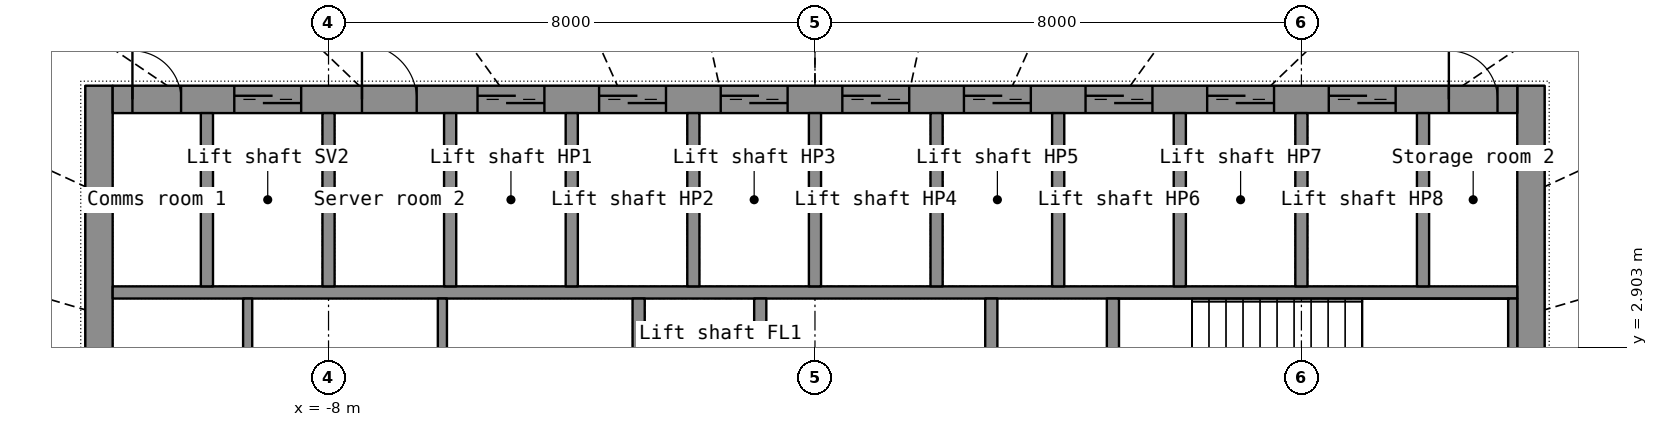
"""IFC4 building model, lengths in metres.
Left out: names, types, materials, properties, quantities, classifications, styles, units other than length and angle.
Written with IfcOpenShell. Run it as: python <this file> out.ifc"""

import sys

from ifc_helpers import new_model, si_unit, direction, frame, frame_2d, origin, place, context, subcontext, project, spatial, rectangle, extrude, element, fill, save


model = new_model("IFC4")
c1 = context("Model", 3, precision=1e-05, world=origin(), true_north=direction((0.0, 1.0)))
c2 = subcontext(c1, "Body", "Model", "MODEL_VIEW")
j1 = project(units=[si_unit("LENGTHUNIT", "METRE"), si_unit("PLANEANGLEUNIT", "RADIAN")], contexts=[c1])
p1 = place(None, origin())
s1 = spatial("IfcSite", under=j1, at=p1, CompositionType="ELEMENT")
p2 = place(p1, origin())
s2 = spatial("IfcBuilding", under=s1, at=p2, CompositionType="ELEMENT")
p3 = place(p2, frame((0.0, 0.0, 205.2)))
s3 = spatial("IfcBuildingStorey", under=s2, at=p3, CompositionType="ELEMENT", Elevation=205.2)
p4 = place(p3, frame((-11.775, -7.2, 0.0), z_axis=(0.0, 0.0, 1.0), x_axis=(0.0, 1.0, 0.0)))
e1 = element("IfcWall", 1, at=p4, inside=s3, PredefinedType="SHEAR", context=c2, shape_type="SweptSolid", body=[
    extrude(rectangle(XDim=14.4, YDim=0.45, at=frame_2d((7.2, 0.0))), origin(), (0.0, 0.0, 1.0), 7.0),
])
p5 = place(p4, frame((6.5, 0.0, 0.0)))
e2 = element("IfcOpeningElement", 2, at=p5, cuts=e1, PredefinedType="OPENING", context=c2, shape_type="SweptSolid", body=[
    extrude(rectangle(XDim=1.4, YDim=2.2, at=frame_2d((0.7, 1.1))), frame((0.0, 0.235, 0.0), z_axis=(0.0, -1.0, 0.0), x_axis=(1.0, 0.0, 0.0)), (0.0, 0.0, 1.0), 0.47),
])
p6 = place(p3, frame((11.775, -7.2, 0.0), z_axis=(0.0, 0.0, 1.0), x_axis=(0.0, 1.0, 0.0)))
e3 = element("IfcWall", 3, at=p6, inside=s3, PredefinedType="SHEAR", context=c2, shape_type="SweptSolid", body=[
    extrude(rectangle(XDim=14.4, YDim=0.45, at=frame_2d((7.2, 0.0))), origin(), (0.0, 0.0, 1.0), 7.0),
])
p7 = place(p6, frame((6.5, 0.0, 0.0)))
e4 = element("IfcOpeningElement", 4, at=p7, cuts=e3, PredefinedType="OPENING", context=c2, shape_type="SweptSolid", body=[
    extrude(rectangle(XDim=1.4, YDim=2.2, at=frame_2d((0.7, 1.1))), frame((0.0, 0.235, 0.0), z_axis=(0.0, -1.0, 0.0), x_axis=(1.0, 0.0, 0.0)), (0.0, 0.0, 1.0), 0.47),
])
p8 = place(p3, frame((-11.55, 6.975, 0.0), z_axis=(0.0, 0.0, 1.0), x_axis=(1.0, 0.0, 0.0)))
e5 = element("IfcWall", 5, at=p8, inside=s3, PredefinedType="SHEAR", context=c2, shape_type="SweptSolid", body=[
    extrude(rectangle(XDim=23.1, YDim=0.45, at=frame_2d((11.55, 0.0))), origin(), (0.0, 0.0, 1.0), 7.0),
])
p9 = place(p8, frame((2.0, 0.0, 0.0)))
e6 = element("IfcOpeningElement", 6, at=p9, cuts=e5, PredefinedType="OPENING", context=c2, shape_type="SweptSolid", body=[
    extrude(rectangle(XDim=1.1, YDim=2.2, at=frame_2d((0.55, 1.1))), frame((0.0, 0.235, 0.0), z_axis=(0.0, -1.0, 0.0), x_axis=(1.0, 0.0, 0.0)), (0.0, 0.0, 1.0), 0.47),
])
p10 = place(p8, frame((6.0, 0.0, 0.0)))
e7 = element("IfcOpeningElement", 7, at=p10, cuts=e5, PredefinedType="OPENING", context=c2, shape_type="SweptSolid", body=[
    extrude(rectangle(XDim=1.1, YDim=2.2, at=frame_2d((0.55, 1.1))), frame((0.0, 0.235, 0.0), z_axis=(0.0, -1.0, 0.0), x_axis=(1.0, 0.0, 0.0)), (0.0, 0.0, 1.0), 0.47),
])
p11 = place(p8, frame((8.0, 0.0, 0.0)))
e8 = element("IfcOpeningElement", 8, at=p11, cuts=e5, PredefinedType="OPENING", context=c2, shape_type="SweptSolid", body=[
    extrude(rectangle(XDim=1.1, YDim=2.2, at=frame_2d((0.55, 1.1))), frame((0.0, 0.235, 0.0), z_axis=(0.0, -1.0, 0.0), x_axis=(1.0, 0.0, 0.0)), (0.0, 0.0, 1.0), 0.47),
])
p12 = place(p8, frame((10.0, 0.0, 0.0)))
e9 = element("IfcOpeningElement", 9, at=p12, cuts=e5, PredefinedType="OPENING", context=c2, shape_type="SweptSolid", body=[
    extrude(rectangle(XDim=1.1, YDim=2.2, at=frame_2d((0.55, 1.1))), frame((0.0, 0.235, 0.0), z_axis=(0.0, -1.0, 0.0), x_axis=(1.0, 0.0, 0.0)), (0.0, 0.0, 1.0), 0.47),
])
p13 = place(p8, frame((12.0, 0.0, 0.0)))
e10 = element("IfcOpeningElement", 10, at=p13, cuts=e5, PredefinedType="OPENING", context=c2, shape_type="SweptSolid", body=[
    extrude(rectangle(XDim=1.1, YDim=2.2, at=frame_2d((0.55, 1.1))), frame((0.0, 0.235, 0.0), z_axis=(0.0, -1.0, 0.0), x_axis=(1.0, 0.0, 0.0)), (0.0, 0.0, 1.0), 0.47),
])
p14 = place(p8, frame((14.0, 0.0, 0.0)))
e11 = element("IfcOpeningElement", 11, at=p14, cuts=e5, PredefinedType="OPENING", context=c2, shape_type="SweptSolid", body=[
    extrude(rectangle(XDim=1.1, YDim=2.2, at=frame_2d((0.55, 1.1))), frame((0.0, 0.235, 0.0), z_axis=(0.0, -1.0, 0.0), x_axis=(1.0, 0.0, 0.0)), (0.0, 0.0, 1.0), 0.47),
])
p15 = place(p8, frame((16.0, 0.0, 0.0)))
e12 = element("IfcOpeningElement", 12, at=p15, cuts=e5, PredefinedType="OPENING", context=c2, shape_type="SweptSolid", body=[
    extrude(rectangle(XDim=1.1, YDim=2.2, at=frame_2d((0.55, 1.1))), frame((0.0, 0.235, 0.0), z_axis=(0.0, -1.0, 0.0), x_axis=(1.0, 0.0, 0.0)), (0.0, 0.0, 1.0), 0.47),
])
p16 = place(p8, frame((18.0, 0.0, 0.0)))
e13 = element("IfcOpeningElement", 13, at=p16, cuts=e5, PredefinedType="OPENING", context=c2, shape_type="SweptSolid", body=[
    extrude(rectangle(XDim=1.1, YDim=2.2, at=frame_2d((0.55, 1.1))), frame((0.0, 0.235, 0.0), z_axis=(0.0, -1.0, 0.0), x_axis=(1.0, 0.0, 0.0)), (0.0, 0.0, 1.0), 0.47),
])
p17 = place(p8, frame((20.0, 0.0, 0.0)))
e14 = element("IfcOpeningElement", 14, at=p17, cuts=e5, PredefinedType="OPENING", context=c2, shape_type="SweptSolid", body=[
    extrude(rectangle(XDim=1.1, YDim=2.2, at=frame_2d((0.55, 1.1))), frame((0.0, 0.235, 0.0), z_axis=(0.0, -1.0, 0.0), x_axis=(1.0, 0.0, 0.0)), (0.0, 0.0, 1.0), 0.47),
])
p18 = place(p8, frame((4.1, 0.0, 0.0)))
e15 = element("IfcOpeningElement", 15, at=p18, cuts=e5, PredefinedType="OPENING", context=c2, shape_type="SweptSolid", body=[
    extrude(rectangle(XDim=0.9, YDim=2.1, at=frame_2d((0.45, 1.05))), frame((0.0, 0.235, 0.0), z_axis=(0.0, -1.0, 0.0), x_axis=(1.0, 0.0, 0.0)), (0.0, 0.0, 1.0), 0.47),
])
p19 = place(p8, frame((0.325, 0.0, 0.0)))
e16 = element("IfcOpeningElement", 16, at=p19, cuts=e5, PredefinedType="OPENING", context=c2, shape_type="SweptSolid", body=[
    extrude(rectangle(XDim=0.8, YDim=2.05, at=frame_2d((0.4, 1.025))), frame((0.0, 0.235, 0.0), z_axis=(0.0, -1.0, 0.0), x_axis=(1.0, 0.0, 0.0)), (0.0, 0.0, 1.0), 0.47),
])
p20 = place(p8, frame((21.975, 0.0, 0.0)))
e17 = element("IfcOpeningElement", 17, at=p20, cuts=e5, PredefinedType="OPENING", context=c2, shape_type="SweptSolid", body=[
    extrude(rectangle(XDim=0.8, YDim=2.05, at=frame_2d((0.4, 1.025))), frame((0.0, 0.235, 0.0), z_axis=(0.0, -1.0, 0.0), x_axis=(1.0, 0.0, 0.0)), (0.0, 0.0, 1.0), 0.47),
])
p21 = place(p3, frame((-11.55, 3.8, 0.0), z_axis=(0.0, 0.0, 1.0), x_axis=(1.0, 0.0, 0.0)))
e18 = element("IfcWall", 18, at=p21, inside=s3, PredefinedType="SHEAR", context=c2, shape_type="SweptSolid", body=[
    extrude(rectangle(XDim=23.1, YDim=0.2, at=frame_2d((11.55, 0.0))), origin(), (0.0, 0.0, 1.0), 7.0),
])
for number, where, z_axis, x_axis in (
    (19, (-10.0, 3.9, 0.0), (0.0, 0.0, 1.0), (0.0, 1.0, 0.0)),
    (20, (-8.0, 3.9, 0.0), (0.0, 0.0, 1.0), (0.0, 1.0, 0.0)),
    (21, (-6.0, 3.9, 0.0), (0.0, 0.0, 1.0), (0.0, 1.0, 0.0)),
    (22, (-4.0, 3.9, 0.0), (0.0, 0.0, 1.0), (0.0, 1.0, 0.0)),
    (23, (-2.0, 3.9, 0.0), (0.0, 0.0, 1.0), (0.0, 1.0, 0.0)),
    (24, (0.0, 3.9, 0.0), (0.0, 0.0, 1.0), (0.0, 1.0, 0.0)),
    (25, (2.0, 3.9, 0.0), (0.0, 0.0, 1.0), (0.0, 1.0, 0.0)),
    (26, (4.0, 3.9, 0.0), (0.0, 0.0, 1.0), (0.0, 1.0, 0.0)),
    (27, (6.0, 3.9, 0.0), (0.0, 0.0, 1.0), (0.0, 1.0, 0.0)),
    (28, (8.0, 3.9, 0.0), (0.0, 0.0, 1.0), (0.0, 1.0, 0.0)),
    (29, (10.0, 3.9, 0.0), (0.0, 0.0, 1.0), (0.0, 1.0, 0.0)),
):
    element("IfcWall", number, at=place(p3, frame(where, z_axis=z_axis, x_axis=x_axis)), inside=s3, PredefinedType="SHEAR", context=c2, shape_type="SweptSolid", body=[
        extrude(rectangle(XDim=2.85, YDim=0.2, at=frame_2d((1.425, 0.0))), origin(), (0.0, 0.0, 1.0), 7.0),
    ])
p22 = place(p3, frame((-2.9, -3.7, 0.0), z_axis=(0.0, 0.0, 1.0), x_axis=(0.0, 1.0, 0.0)))
e30 = element("IfcWall", 30, at=p22, inside=s3, PredefinedType="SHEAR", context=c2, shape_type="SweptSolid", body=[
    extrude(rectangle(XDim=7.4, YDim=0.2, at=frame_2d((3.7, 0.0))), origin(), (0.0, 0.0, 1.0), 7.0),
])
p23 = place(p22, frame((3.1, 0.0, 0.0)))
e31 = element("IfcOpeningElement", 31, at=p23, cuts=e30, PredefinedType="OPENING", context=c2, shape_type="SweptSolid", body=[
    extrude(rectangle(XDim=1.2, YDim=2.2, at=frame_2d((0.6, 1.1))), frame((0.0, 0.11, 0.0), z_axis=(0.0, -1.0, 0.0), x_axis=(1.0, 0.0, 0.0)), (0.0, 0.0, 1.0), 0.22),
])
p24 = place(p3, frame((2.9, -3.7, 0.0), z_axis=(0.0, 0.0, 1.0), x_axis=(0.0, 1.0, 0.0)))
e32 = element("IfcWall", 32, at=p24, inside=s3, PredefinedType="SHEAR", context=c2, shape_type="SweptSolid", body=[
    extrude(rectangle(XDim=7.4, YDim=0.2, at=frame_2d((3.7, 0.0))), origin(), (0.0, 0.0, 1.0), 7.0),
])
p25 = place(p24, frame((3.1, 0.0, 0.0)))
e33 = element("IfcOpeningElement", 33, at=p25, cuts=e32, PredefinedType="OPENING", context=c2, shape_type="SweptSolid", body=[
    extrude(rectangle(XDim=1.2, YDim=2.2, at=frame_2d((0.6, 1.1))), frame((0.0, 0.11, 0.0), z_axis=(0.0, -1.0, 0.0), x_axis=(1.0, 0.0, 0.0)), (0.0, 0.0, 1.0), 0.22),
])
p26 = place(p3, frame((-0.9, 1.35, 0.0), z_axis=(0.0, 0.0, 1.0), x_axis=(0.0, 1.0, 0.0)))
e34 = element("IfcWall", 34, at=p26, inside=s3, PredefinedType="SHEAR", context=c2, shape_type="SweptSolid", body=[
    extrude(rectangle(XDim=2.35, YDim=0.2, at=frame_2d((1.175, 0.0))), origin(), (0.0, 0.0, 1.0), 7.0),
])
p27 = place(p3, frame((11.475, 1.35, 0.0), z_axis=(0.0, 0.0, 1.0), x_axis=(0.0, 1.0, 0.0)))
e35 = element("IfcWall", 35, at=p27, inside=s3, PredefinedType="SHEAR", context=c2, shape_type="SweptSolid", body=[
    extrude(rectangle(XDim=2.35, YDim=0.15, at=frame_2d((1.175, 0.0))), origin(), (0.0, 0.0, 1.0), 7.0),
])
p28 = place(p3, frame((4.9, 1.35, 0.0), z_axis=(0.0, 0.0, 1.0), x_axis=(0.0, 1.0, 0.0)))
e36 = element("IfcWall", 36, at=p28, inside=s3, PredefinedType="SHEAR", context=c2, shape_type="SweptSolid", body=[
    extrude(rectangle(XDim=2.35, YDim=0.2, at=frame_2d((1.175, 0.0))), origin(), (0.0, 0.0, 1.0), 7.0),
])
for number, where, z_axis, x_axis in (
    (37, (-9.33, 1.35, 0.0), (0.0, 0.0, 1.0), (0.0, 1.0, 0.0)),
    (38, (-6.127, 1.35, 0.0), (0.0, 0.0, 1.0), (0.0, 1.0, 0.0)),
):
    element("IfcWall", number, at=place(p3, frame(where, z_axis=z_axis, x_axis=x_axis)), inside=s3, PredefinedType="PARTITIONING", context=c2, shape_type="SweptSolid", body=[
        extrude(rectangle(XDim=2.35, YDim=0.15, at=frame_2d((1.175, 0.0))), origin(), (0.0, 0.0, 1.0), 7.0),
    ])
p29 = place(p9, origin())
e39 = element("IfcDoor", 39, at=p29, inside=s3, OperationType="DOUBLE_DOOR_SLIDING", PredefinedType="DOOR", context=c2, shape_type="SweptSolid", body=[
    extrude(rectangle(XDim=1.1, YDim=2.2, at=frame_2d((0.55, 1.1))), frame((0.0, 0.025, 0.0), z_axis=(0.0, -1.0, 0.0), x_axis=(1.0, 0.0, 0.0)), (0.0, 0.0, 1.0), 0.05),
])
fill(e6, e39)
p30 = place(p10, origin())
e40 = element("IfcDoor", 40, at=p30, inside=s3, OperationType="DOUBLE_DOOR_SLIDING", PredefinedType="DOOR", context=c2, shape_type="SweptSolid", body=[
    extrude(rectangle(XDim=1.1, YDim=2.2, at=frame_2d((0.55, 1.1))), frame((0.0, 0.025, 0.0), z_axis=(0.0, -1.0, 0.0), x_axis=(1.0, 0.0, 0.0)), (0.0, 0.0, 1.0), 0.05),
])
fill(e7, e40)
p31 = place(p11, origin())
e41 = element("IfcDoor", 41, at=p31, inside=s3, OperationType="DOUBLE_DOOR_SLIDING", PredefinedType="DOOR", context=c2, shape_type="SweptSolid", body=[
    extrude(rectangle(XDim=1.1, YDim=2.2, at=frame_2d((0.55, 1.1))), frame((0.0, 0.025, 0.0), z_axis=(0.0, -1.0, 0.0), x_axis=(1.0, 0.0, 0.0)), (0.0, 0.0, 1.0), 0.05),
])
fill(e8, e41)
p32 = place(p12, origin())
e42 = element("IfcDoor", 42, at=p32, inside=s3, OperationType="DOUBLE_DOOR_SLIDING", PredefinedType="DOOR", context=c2, shape_type="SweptSolid", body=[
    extrude(rectangle(XDim=1.1, YDim=2.2, at=frame_2d((0.55, 1.1))), frame((0.0, 0.025, 0.0), z_axis=(0.0, -1.0, 0.0), x_axis=(1.0, 0.0, 0.0)), (0.0, 0.0, 1.0), 0.05),
])
fill(e9, e42)
p33 = place(p13, origin())
e43 = element("IfcDoor", 43, at=p33, inside=s3, OperationType="DOUBLE_DOOR_SLIDING", PredefinedType="DOOR", context=c2, shape_type="SweptSolid", body=[
    extrude(rectangle(XDim=1.1, YDim=2.2, at=frame_2d((0.55, 1.1))), frame((0.0, 0.025, 0.0), z_axis=(0.0, -1.0, 0.0), x_axis=(1.0, 0.0, 0.0)), (0.0, 0.0, 1.0), 0.05),
])
fill(e10, e43)
p34 = place(p14, origin())
e44 = element("IfcDoor", 44, at=p34, inside=s3, OperationType="DOUBLE_DOOR_SLIDING", PredefinedType="DOOR", context=c2, shape_type="SweptSolid", body=[
    extrude(rectangle(XDim=1.1, YDim=2.2, at=frame_2d((0.55, 1.1))), frame((0.0, 0.025, 0.0), z_axis=(0.0, -1.0, 0.0), x_axis=(1.0, 0.0, 0.0)), (0.0, 0.0, 1.0), 0.05),
])
fill(e11, e44)
p35 = place(p15, origin())
e45 = element("IfcDoor", 45, at=p35, inside=s3, OperationType="DOUBLE_DOOR_SLIDING", PredefinedType="DOOR", context=c2, shape_type="SweptSolid", body=[
    extrude(rectangle(XDim=1.1, YDim=2.2, at=frame_2d((0.55, 1.1))), frame((0.0, 0.025, 0.0), z_axis=(0.0, -1.0, 0.0), x_axis=(1.0, 0.0, 0.0)), (0.0, 0.0, 1.0), 0.05),
])
fill(e12, e45)
p36 = place(p16, origin())
e46 = element("IfcDoor", 46, at=p36, inside=s3, OperationType="DOUBLE_DOOR_SLIDING", PredefinedType="DOOR", context=c2, shape_type="SweptSolid", body=[
    extrude(rectangle(XDim=1.1, YDim=2.2, at=frame_2d((0.55, 1.1))), frame((0.0, 0.025, 0.0), z_axis=(0.0, -1.0, 0.0), x_axis=(1.0, 0.0, 0.0)), (0.0, 0.0, 1.0), 0.05),
])
fill(e13, e46)
p37 = place(p17, origin())
e47 = element("IfcDoor", 47, at=p37, inside=s3, OperationType="DOUBLE_DOOR_SLIDING", PredefinedType="DOOR", context=c2, shape_type="SweptSolid", body=[
    extrude(rectangle(XDim=1.1, YDim=2.2, at=frame_2d((0.55, 1.1))), frame((0.0, 0.025, 0.0), z_axis=(0.0, -1.0, 0.0), x_axis=(1.0, 0.0, 0.0)), (0.0, 0.0, 1.0), 0.05),
])
fill(e14, e47)
p38 = place(p18, origin())
e48 = element("IfcDoor", 48, at=p38, inside=s3, OperationType="SINGLE_SWING_LEFT", PredefinedType="DOOR", context=c2, shape_type="SweptSolid", body=[
    extrude(rectangle(XDim=0.9, YDim=2.1, at=frame_2d((0.45, 1.05))), frame((0.0, 0.025, 0.0), z_axis=(0.0, -1.0, 0.0), x_axis=(1.0, 0.0, 0.0)), (0.0, 0.0, 1.0), 0.05),
])
fill(e15, e48)
p39 = place(p19, origin())
e49 = element("IfcDoor", 49, at=p39, inside=s3, OperationType="SINGLE_SWING_LEFT", PredefinedType="DOOR", context=c2, shape_type="SweptSolid", body=[
    extrude(rectangle(XDim=0.8, YDim=2.05, at=frame_2d((0.4, 1.025))), frame((0.0, 0.025, 0.0), z_axis=(0.0, -1.0, 0.0), x_axis=(1.0, 0.0, 0.0)), (0.0, 0.0, 1.0), 0.05),
])
fill(e16, e49)
p40 = place(p20, origin())
e50 = element("IfcDoor", 50, at=p40, inside=s3, OperationType="SINGLE_SWING_LEFT", PredefinedType="DOOR", context=c2, shape_type="SweptSolid", body=[
    extrude(rectangle(XDim=0.8, YDim=2.05, at=frame_2d((0.4, 1.025))), frame((0.0, 0.025, 0.0), z_axis=(0.0, -1.0, 0.0), x_axis=(1.0, 0.0, 0.0)), (0.0, 0.0, 1.0), 0.05),
])
fill(e17, e50)
save(model, sys.argv[1])
